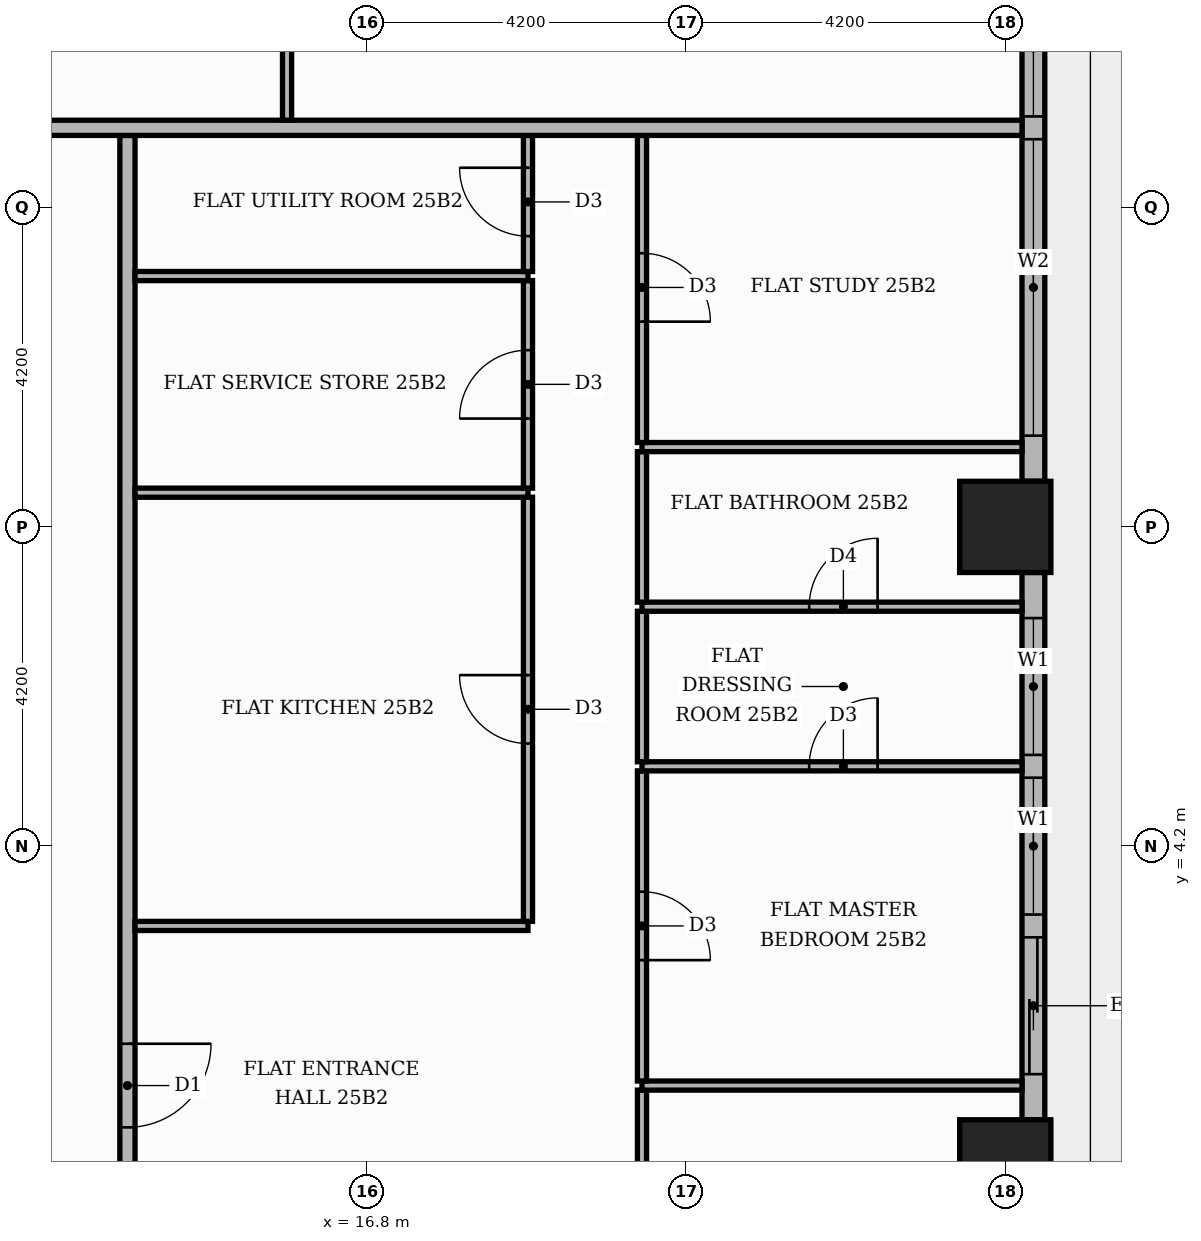
"""IFC4 building model, lengths in metres.
Left out: names, types, materials, properties, quantities, classifications, styles, units other than length and angle.
Written with IfcOpenShell. Run it as: python <this file> out.ifc"""

import sys

from ifc_helpers import new_model, si_unit, direction, frame, frame_2d, origin, origin_2d, place, context, subcontext, project, spatial, rectangle, extrude, element, fill, save


model = new_model("IFC4")
c1 = context("Model", 3, precision=1e-05, world=origin(), true_north=direction((0.0, 1.0)))
c2 = subcontext(c1, "Body", "Model", "MODEL_VIEW")
j1 = project(units=[si_unit("LENGTHUNIT", "METRE"), si_unit("PLANEANGLEUNIT", "RADIAN")], contexts=[c1])
p1 = place(None, origin())
s1 = spatial("IfcSite", under=j1, at=p1, CompositionType="ELEMENT")
p2 = place(p1, origin())
s2 = spatial("IfcBuilding", under=s1, at=p2, CompositionType="ELEMENT")
p3 = place(p2, frame((0.0, 0.0, 106.5)))
s3 = spatial("IfcBuildingStorey", under=s2, at=p3, CompositionType="ELEMENT", Elevation=106.5)
for number, where, z_axis, x_axis in (
    (1, (25.2, 0.0, 0.0), (0.0, 0.0, 1.0), (1.0, 0.0, 0.0)),
    (2, (25.2, 8.4, 0.0), (0.0, 0.0, 1.0), (1.0, 0.0, 0.0)),
):
    element("IfcColumn", number, at=place(p3, frame(where, z_axis=z_axis, x_axis=x_axis)), inside=s3, PredefinedType="COLUMN", context=c2, shape_type="SweptSolid", body=[
        extrude(rectangle(XDim=1.2, YDim=1.2, at=origin_2d()), origin(), (0.0, 0.0, 1.0), 3.9),
    ])
p4 = place(p3, frame((25.57, 0.6, 0.0), z_axis=(0.0, 0.0, 1.0), x_axis=(0.0, 1.0, 0.0)))
e3 = element("IfcWall", 3, at=p4, inside=s3, PredefinedType="STANDARD", context=c2, shape_type="SweptSolid", body=[
    extrude(rectangle(XDim=7.2, YDim=0.3, at=frame_2d((3.6, 0.0))), origin(), (0.0, 0.0, 1.0), 3.48),
])
p5 = place(p4, frame((0.6, 0.0, 0.0)))
e4 = element("IfcOpeningElement", 4, at=p5, cuts=e3, PredefinedType="OPENING", context=c2, shape_type="SweptSolid", body=[
    extrude(rectangle(XDim=1.8, YDim=2.4, at=frame_2d((0.9, 1.2))), frame((0.0, 0.16, 0.0), z_axis=(0.0, -1.0, 0.0), x_axis=(1.0, 0.0, 0.0)), (0.0, 0.0, 1.0), 0.32),
])
p6 = place(p4, frame((2.7, 0.0, 0.9)))
e5 = element("IfcOpeningElement", 5, at=p6, cuts=e3, PredefinedType="OPENING", context=c2, shape_type="SweptSolid", body=[
    extrude(rectangle(XDim=1.8, YDim=2.1, at=frame_2d((0.9, 1.05))), frame((0.0, 0.16, 0.0), z_axis=(0.0, -1.0, 0.0), x_axis=(1.0, 0.0, 0.0)), (0.0, 0.0, 1.0), 0.32),
])
p7 = place(p4, frame((4.8, 0.0, 0.9)))
e6 = element("IfcOpeningElement", 6, at=p7, cuts=e3, PredefinedType="OPENING", context=c2, shape_type="SweptSolid", body=[
    extrude(rectangle(XDim=1.8, YDim=2.1, at=frame_2d((0.9, 1.05))), frame((0.0, 0.16, 0.0), z_axis=(0.0, -1.0, 0.0), x_axis=(1.0, 0.0, 0.0)), (0.0, 0.0, 1.0), 0.32),
])
p8 = place(p3, frame((25.57, 9.0, 0.0), z_axis=(0.0, 0.0, 1.0), x_axis=(0.0, 1.0, 0.0)))
e7 = element("IfcWall", 7, at=p8, inside=s3, PredefinedType="STANDARD", context=c2, shape_type="SweptSolid", body=[
    extrude(rectangle(XDim=7.2, YDim=0.3, at=frame_2d((3.6, 0.0))), origin(), (0.0, 0.0, 1.0), 3.48),
])
p9 = place(p8, frame((0.6, 0.0, 0.9)))
e8 = element("IfcOpeningElement", 8, at=p9, cuts=e7, PredefinedType="OPENING", context=c2, shape_type="SweptSolid", body=[
    extrude(rectangle(XDim=3.9, YDim=2.1, at=frame_2d((1.95, 1.05))), frame((0.0, 0.16, 0.0), z_axis=(0.0, -1.0, 0.0), x_axis=(1.0, 0.0, 0.0)), (0.0, 0.0, 1.0), 0.32),
])
p10 = place(p8, frame((4.8, 0.0, 0.9)))
e9 = element("IfcOpeningElement", 9, at=p10, cuts=e7, PredefinedType="OPENING", context=c2, shape_type="SweptSolid", body=[
    extrude(rectangle(XDim=1.8, YDim=2.1, at=frame_2d((0.9, 1.05))), frame((0.0, 0.16, 0.0), z_axis=(0.0, -1.0, 0.0), x_axis=(1.0, 0.0, 0.0)), (0.0, 0.0, 1.0), 0.32),
])
p11 = place(p3, frame((13.65, -5.15, 0.0), z_axis=(0.0, 0.0, 1.0), x_axis=(0.0, 1.0, 0.0)))
e10 = element("IfcWall", 10, at=p11, inside=s3, PredefinedType="PARTITIONING", context=c2, shape_type="SweptSolid", body=[
    extrude(rectangle(XDim=18.7, YDim=0.2, at=frame_2d((9.35, 0.0))), origin(), (0.0, 0.0, 1.0), 3.48),
])
p12 = place(p11, frame((5.65, 0.0, 0.0)))
e11 = element("IfcOpeningElement", 11, at=p12, cuts=e10, PredefinedType="OPENING", context=c2, shape_type="SweptSolid", body=[
    extrude(rectangle(XDim=1.1, YDim=2.4, at=frame_2d((0.55, 1.2))), frame((0.0, 0.11, 0.0), z_axis=(0.0, -1.0, 0.0), x_axis=(1.0, 0.0, 0.0)), (0.0, 0.0, 1.0), 0.22),
])
p13 = place(p3, frame((20.42, -5.15, 0.0), z_axis=(0.0, 0.0, 1.0), x_axis=(0.0, 1.0, 0.0)))
e12 = element("IfcWall", 12, at=p13, inside=s3, PredefinedType="PARTITIONING", context=c2, shape_type="SweptSolid", body=[
    extrude(rectangle(XDim=6.14, YDim=0.12, at=frame_2d((3.07, 0.0))), origin(), (0.0, 0.0, 1.0), 3.48),
])
p14 = place(p13, frame((2.55, 0.0, 0.0)))
e13 = element("IfcOpeningElement", 13, at=p14, cuts=e12, PredefinedType="OPENING", context=c2, shape_type="SweptSolid", body=[
    extrude(rectangle(XDim=1.0, YDim=2.1, at=frame_2d((0.5, 1.05))), frame((0.0, 0.07, 0.0), z_axis=(0.0, -1.0, 0.0), x_axis=(1.0, 0.0, 0.0)), (0.0, 0.0, 1.0), 0.14),
])
p15 = place(p3, frame((20.42, 1.05, 0.0), z_axis=(0.0, 0.0, 1.0), x_axis=(1.0, 0.0, 0.0)))
e14 = element("IfcWall", 14, at=p15, inside=s3, PredefinedType="PARTITIONING", context=c2, shape_type="SweptSolid", body=[
    extrude(rectangle(XDim=5.0, YDim=0.12, at=frame_2d((2.5, 0.0))), origin(), (0.0, 0.0, 1.0), 3.48),
])
p16 = place(p3, frame((20.42, 1.11, 0.0), z_axis=(0.0, 0.0, 1.0), x_axis=(0.0, 1.0, 0.0)))
e15 = element("IfcWall", 15, at=p16, inside=s3, PredefinedType="PARTITIONING", context=c2, shape_type="SweptSolid", body=[
    extrude(rectangle(XDim=4.08, YDim=0.12, at=frame_2d((2.04, 0.0))), origin(), (0.0, 0.0, 1.0), 3.48),
])
p17 = place(p16, frame((1.59, 0.0, 0.0)))
e16 = element("IfcOpeningElement", 16, at=p17, cuts=e15, PredefinedType="OPENING", context=c2, shape_type="SweptSolid", body=[
    extrude(rectangle(XDim=0.9, YDim=2.1, at=frame_2d((0.45, 1.05))), frame((0.0, 0.07, 0.0), z_axis=(0.0, -1.0, 0.0), x_axis=(1.0, 0.0, 0.0)), (0.0, 0.0, 1.0), 0.14),
])
p18 = place(p3, frame((13.75, 3.15, 0.0), z_axis=(0.0, 0.0, 1.0), x_axis=(1.0, 0.0, 0.0)))
e17 = element("IfcWall", 17, at=p18, inside=s3, PredefinedType="PARTITIONING", context=c2, shape_type="SweptSolid", body=[
    extrude(rectangle(XDim=5.17, YDim=0.12, at=frame_2d((2.585, 0.0))), origin(), (0.0, 0.0, 1.0), 3.48),
])
p19 = place(p3, frame((18.92, 3.21, 0.0), z_axis=(0.0, 0.0, 1.0), x_axis=(0.0, 1.0, 0.0)))
e18 = element("IfcWall", 18, at=p19, inside=s3, PredefinedType="PARTITIONING", context=c2, shape_type="SweptSolid", body=[
    extrude(rectangle(XDim=5.58, YDim=0.12, at=frame_2d((2.79, 0.0))), origin(), (0.0, 0.0, 1.0), 3.48),
])
p20 = place(p19, frame((2.34, 0.0, 0.0)))
e19 = element("IfcOpeningElement", 19, at=p20, cuts=e18, PredefinedType="OPENING", context=c2, shape_type="SweptSolid", body=[
    extrude(rectangle(XDim=0.9, YDim=2.1, at=frame_2d((0.45, 1.05))), frame((0.0, 0.07, 0.0), z_axis=(0.0, -1.0, 0.0), x_axis=(1.0, 0.0, 0.0)), (0.0, 0.0, 1.0), 0.14),
])
p21 = place(p3, frame((20.42, 5.25, 0.0), z_axis=(0.0, 0.0, 1.0), x_axis=(1.0, 0.0, 0.0)))
e20 = element("IfcWall", 20, at=p21, inside=s3, PredefinedType="PARTITIONING", context=c2, shape_type="SweptSolid", body=[
    extrude(rectangle(XDim=5.0, YDim=0.12, at=frame_2d((2.5, 0.0))), origin(), (0.0, 0.0, 1.0), 3.48),
])
p22 = place(p21, frame((2.2, 0.0, 0.0)))
e21 = element("IfcOpeningElement", 21, at=p22, cuts=e20, PredefinedType="OPENING", context=c2, shape_type="SweptSolid", body=[
    extrude(rectangle(XDim=0.9, YDim=2.1, at=frame_2d((0.45, 1.05))), frame((0.0, 0.07, 0.0), z_axis=(0.0, -1.0, 0.0), x_axis=(1.0, 0.0, 0.0)), (0.0, 0.0, 1.0), 0.14),
])
p23 = place(p3, frame((20.42, 5.31, 0.0), z_axis=(0.0, 0.0, 1.0), x_axis=(0.0, 1.0, 0.0)))
e22 = element("IfcWall", 22, at=p23, inside=s3, PredefinedType="PARTITIONING", context=c2, shape_type="SweptSolid", body=[
    extrude(rectangle(XDim=1.98, YDim=0.12, at=frame_2d((0.99, 0.0))), origin(), (0.0, 0.0, 1.0), 3.48),
])
p24 = place(p3, frame((20.42, 7.35, 0.0), z_axis=(0.0, 0.0, 1.0), x_axis=(1.0, 0.0, 0.0)))
e23 = element("IfcWall", 23, at=p24, inside=s3, PredefinedType="PARTITIONING", context=c2, shape_type="SweptSolid", body=[
    extrude(rectangle(XDim=5.0, YDim=0.12, at=frame_2d((2.5, 0.0))), origin(), (0.0, 0.0, 1.0), 3.48),
])
p25 = place(p24, frame((2.2, 0.0, 0.0)))
e24 = element("IfcOpeningElement", 24, at=p25, cuts=e23, PredefinedType="OPENING", context=c2, shape_type="SweptSolid", body=[
    extrude(rectangle(XDim=0.9, YDim=2.1, at=frame_2d((0.45, 1.05))), frame((0.0, 0.07, 0.0), z_axis=(0.0, -1.0, 0.0), x_axis=(1.0, 0.0, 0.0)), (0.0, 0.0, 1.0), 0.14),
])
p26 = place(p3, frame((20.42, 7.41, 0.0), z_axis=(0.0, 0.0, 1.0), x_axis=(0.0, 1.0, 0.0)))
e25 = element("IfcWall", 25, at=p26, inside=s3, PredefinedType="PARTITIONING", context=c2, shape_type="SweptSolid", body=[
    extrude(rectangle(XDim=1.98, YDim=0.12, at=frame_2d((0.99, 0.0))), origin(), (0.0, 0.0, 1.0), 3.48),
])
p27 = place(p3, frame((13.75, 8.85, 0.0), z_axis=(0.0, 0.0, 1.0), x_axis=(1.0, 0.0, 0.0)))
e26 = element("IfcWall", 26, at=p27, inside=s3, PredefinedType="PARTITIONING", context=c2, shape_type="SweptSolid", body=[
    extrude(rectangle(XDim=5.17, YDim=0.12, at=frame_2d((2.585, 0.0))), origin(), (0.0, 0.0, 1.0), 3.48),
])
p28 = place(p3, frame((18.92, 8.91, 0.0), z_axis=(0.0, 0.0, 1.0), x_axis=(0.0, 1.0, 0.0)))
e27 = element("IfcWall", 27, at=p28, inside=s3, PredefinedType="PARTITIONING", context=c2, shape_type="SweptSolid", body=[
    extrude(rectangle(XDim=2.73, YDim=0.12, at=frame_2d((1.365, 0.0))), origin(), (0.0, 0.0, 1.0), 3.48),
])
p29 = place(p28, frame((0.915, 0.0, 0.0)))
e28 = element("IfcOpeningElement", 28, at=p29, cuts=e27, PredefinedType="OPENING", context=c2, shape_type="SweptSolid", body=[
    extrude(rectangle(XDim=0.9, YDim=2.1, at=frame_2d((0.45, 1.05))), frame((0.0, 0.07, 0.0), z_axis=(0.0, -1.0, 0.0), x_axis=(1.0, 0.0, 0.0)), (0.0, 0.0, 1.0), 0.14),
])
p30 = place(p3, frame((20.42, 9.45, 0.0), z_axis=(0.0, 0.0, 1.0), x_axis=(1.0, 0.0, 0.0)))
e29 = element("IfcWall", 29, at=p30, inside=s3, PredefinedType="PARTITIONING", context=c2, shape_type="SweptSolid", body=[
    extrude(rectangle(XDim=5.0, YDim=0.12, at=frame_2d((2.5, 0.0))), origin(), (0.0, 0.0, 1.0), 3.48),
])
p31 = place(p3, frame((20.42, 9.51, 0.0), z_axis=(0.0, 0.0, 1.0), x_axis=(0.0, 1.0, 0.0)))
e30 = element("IfcWall", 30, at=p31, inside=s3, PredefinedType="PARTITIONING", context=c2, shape_type="SweptSolid", body=[
    extrude(rectangle(XDim=4.04, YDim=0.12, at=frame_2d((2.02, 0.0))), origin(), (0.0, 0.0, 1.0), 3.48),
])
p32 = place(p31, frame((1.59, 0.0, 0.0)))
e31 = element("IfcOpeningElement", 31, at=p32, cuts=e30, PredefinedType="OPENING", context=c2, shape_type="SweptSolid", body=[
    extrude(rectangle(XDim=0.9, YDim=2.1, at=frame_2d((0.45, 1.05))), frame((0.0, 0.07, 0.0), z_axis=(0.0, -1.0, 0.0), x_axis=(1.0, 0.0, 0.0)), (0.0, 0.0, 1.0), 0.14),
])
p33 = place(p3, frame((13.75, 11.7, 0.0), z_axis=(0.0, 0.0, 1.0), x_axis=(1.0, 0.0, 0.0)))
e32 = element("IfcWall", 32, at=p33, inside=s3, PredefinedType="PARTITIONING", context=c2, shape_type="SweptSolid", body=[
    extrude(rectangle(XDim=5.17, YDim=0.12, at=frame_2d((2.585, 0.0))), origin(), (0.0, 0.0, 1.0), 3.48),
])
p34 = place(p3, frame((18.92, 11.76, 0.0), z_axis=(0.0, 0.0, 1.0), x_axis=(0.0, 1.0, 0.0)))
e33 = element("IfcWall", 33, at=p34, inside=s3, PredefinedType="PARTITIONING", context=c2, shape_type="SweptSolid", body=[
    extrude(rectangle(XDim=1.79, YDim=0.12, at=frame_2d((0.895, 0.0))), origin(), (0.0, 0.0, 1.0), 3.48),
])
p35 = place(p34, frame((0.465, 0.0, 0.0)))
e34 = element("IfcOpeningElement", 34, at=p35, cuts=e33, PredefinedType="OPENING", context=c2, shape_type="SweptSolid", body=[
    extrude(rectangle(XDim=0.9, YDim=2.1, at=frame_2d((0.45, 1.05))), frame((0.0, 0.07, 0.0), z_axis=(0.0, -1.0, 0.0), x_axis=(1.0, 0.0, 0.0)), (0.0, 0.0, 1.0), 0.14),
])
p36 = place(p3, frame((-13.65, 13.65, 0.0), z_axis=(0.0, 0.0, 1.0), x_axis=(1.0, 0.0, 0.0)))
e35 = element("IfcWall", 35, at=p36, inside=s3, PredefinedType="PARTITIONING", context=c2, shape_type="SweptSolid", body=[
    extrude(rectangle(XDim=39.07, YDim=0.2, at=frame_2d((19.535, 0.0))), origin(), (0.0, 0.0, 1.0), 3.48),
])
p37 = place(p36, frame((24.65, 0.0, 0.0)))
e36 = element("IfcOpeningElement", 36, at=p37, cuts=e35, PredefinedType="OPENING", context=c2, shape_type="SweptSolid", body=[
    extrude(rectangle(XDim=1.1, YDim=2.4, at=frame_2d((0.55, 1.2))), frame((0.0, 0.11, 0.0), z_axis=(0.0, -1.0, 0.0), x_axis=(1.0, 0.0, 0.0)), (0.0, 0.0, 1.0), 0.22),
])
p38 = place(p36, frame((14.15, 0.0, 0.0)))
e37 = element("IfcOpeningElement", 37, at=p38, cuts=e35, PredefinedType="OPENING", context=c2, shape_type="SweptSolid", body=[
    extrude(rectangle(XDim=1.1, YDim=2.4, at=frame_2d((0.55, 1.2))), frame((0.0, 0.11, 0.0), z_axis=(0.0, -1.0, 0.0), x_axis=(1.0, 0.0, 0.0)), (0.0, 0.0, 1.0), 0.22),
])
p39 = place(p3, frame((15.75, 13.75, 0.0), z_axis=(0.0, 0.0, 1.0), x_axis=(0.0, 1.0, 0.0)))
e38 = element("IfcWall", 38, at=p39, inside=s3, PredefinedType="PARTITIONING", context=c2, shape_type="SweptSolid", body=[
    extrude(rectangle(XDim=6.01, YDim=0.12, at=frame_2d((3.005, 0.0))), origin(), (0.0, 0.0, 1.0), 3.48),
])
p40 = place(p39, frame((2.485, 0.0, 0.0)))
e39 = element("IfcOpeningElement", 39, at=p40, cuts=e38, PredefinedType="OPENING", context=c2, shape_type="SweptSolid", body=[
    extrude(rectangle(XDim=1.0, YDim=2.1, at=frame_2d((0.5, 1.05))), frame((0.0, 0.07, 0.0), z_axis=(0.0, -1.0, 0.0), x_axis=(1.0, 0.0, 0.0)), (0.0, 0.0, 1.0), 0.14),
])
p41 = place(p5, origin())
e40 = element("IfcDoor", 40, at=p41, inside=s3, OperationType="SLIDING_TO_LEFT", PredefinedType="DOOR", context=c2, shape_type="SweptSolid", body=[
    extrude(rectangle(XDim=1.8, YDim=2.4, at=frame_2d((0.9, 1.2))), frame((0.0, 0.025, 0.0), z_axis=(0.0, -1.0, 0.0), x_axis=(1.0, 0.0, 0.0)), (0.0, 0.0, 1.0), 0.05),
])
fill(e4, e40)
p42 = place(p6, origin())
e41 = element("IfcWindow", 41, at=p42, inside=s3, PartitioningType="SINGLE_PANEL", PredefinedType="WINDOW", context=c2, shape_type="SweptSolid", body=[
    extrude(rectangle(XDim=1.8, YDim=2.1, at=frame_2d((0.9, 1.05))), frame((0.0, 0.03, 0.0), z_axis=(0.0, -1.0, 0.0), x_axis=(1.0, 0.0, 0.0)), (0.0, 0.0, 1.0), 0.06),
])
fill(e5, e41)
p43 = place(p7, origin())
e42 = element("IfcWindow", 42, at=p43, inside=s3, PartitioningType="SINGLE_PANEL", PredefinedType="WINDOW", context=c2, shape_type="SweptSolid", body=[
    extrude(rectangle(XDim=1.8, YDim=2.1, at=frame_2d((0.9, 1.05))), frame((0.0, 0.03, 0.0), z_axis=(0.0, -1.0, 0.0), x_axis=(1.0, 0.0, 0.0)), (0.0, 0.0, 1.0), 0.06),
])
fill(e6, e42)
p44 = place(p9, origin())
e43 = element("IfcWindow", 43, at=p44, inside=s3, PartitioningType="SINGLE_PANEL", PredefinedType="WINDOW", context=c2, shape_type="SweptSolid", body=[
    extrude(rectangle(XDim=3.9, YDim=2.1, at=frame_2d((1.95, 1.05))), frame((0.0, 0.03, 0.0), z_axis=(0.0, -1.0, 0.0), x_axis=(1.0, 0.0, 0.0)), (0.0, 0.0, 1.0), 0.06),
])
fill(e8, e43)
p45 = place(p10, origin())
e44 = element("IfcWindow", 44, at=p45, inside=s3, PartitioningType="SINGLE_PANEL", PredefinedType="WINDOW", context=c2, shape_type="SweptSolid", body=[
    extrude(rectangle(XDim=1.8, YDim=2.1, at=frame_2d((0.9, 1.05))), frame((0.0, 0.03, 0.0), z_axis=(0.0, -1.0, 0.0), x_axis=(1.0, 0.0, 0.0)), (0.0, 0.0, 1.0), 0.06),
])
fill(e9, e44)
p46 = place(p12, frame((1.1, 0.0, 0.0), z_axis=(0.0, 0.0, 1.0), x_axis=(-1.0, 0.0, 0.0)))
e45 = element("IfcDoor", 45, at=p46, inside=s3, OperationType="SINGLE_SWING_RIGHT", PredefinedType="DOOR", context=c2, shape_type="SweptSolid", body=[
    extrude(rectangle(XDim=1.1, YDim=2.4, at=frame_2d((0.55, 1.2))), frame((0.0, 0.025, 0.0), z_axis=(0.0, -1.0, 0.0), x_axis=(1.0, 0.0, 0.0)), (0.0, 0.0, 1.0), 0.05),
])
fill(e11, e45)
p47 = place(p20, origin())
e46 = element("IfcDoor", 46, at=p47, inside=s3, OperationType="SINGLE_SWING_RIGHT", PredefinedType="DOOR", context=c2, shape_type="SweptSolid", body=[
    extrude(rectangle(XDim=0.9, YDim=2.1, at=frame_2d((0.45, 1.05))), frame((0.0, 0.025, 0.0), z_axis=(0.0, -1.0, 0.0), x_axis=(1.0, 0.0, 0.0)), (0.0, 0.0, 1.0), 0.05),
])
fill(e19, e46)
p48 = place(p29, origin())
e47 = element("IfcDoor", 47, at=p48, inside=s3, OperationType="SINGLE_SWING_LEFT", PredefinedType="DOOR", context=c2, shape_type="SweptSolid", body=[
    extrude(rectangle(XDim=0.9, YDim=2.1, at=frame_2d((0.45, 1.05))), frame((0.0, 0.025, 0.0), z_axis=(0.0, -1.0, 0.0), x_axis=(1.0, 0.0, 0.0)), (0.0, 0.0, 1.0), 0.05),
])
fill(e28, e47)
p49 = place(p35, origin())
e48 = element("IfcDoor", 48, at=p49, inside=s3, OperationType="SINGLE_SWING_RIGHT", PredefinedType="DOOR", context=c2, shape_type="SweptSolid", body=[
    extrude(rectangle(XDim=0.9, YDim=2.1, at=frame_2d((0.45, 1.05))), frame((0.0, 0.025, 0.0), z_axis=(0.0, -1.0, 0.0), x_axis=(1.0, 0.0, 0.0)), (0.0, 0.0, 1.0), 0.05),
])
fill(e34, e48)
p50 = place(p17, frame((0.9, 0.0, 0.0), z_axis=(0.0, 0.0, 1.0), x_axis=(-1.0, 0.0, 0.0)))
e49 = element("IfcDoor", 49, at=p50, inside=s3, OperationType="SINGLE_SWING_LEFT", PredefinedType="DOOR", context=c2, shape_type="SweptSolid", body=[
    extrude(rectangle(XDim=0.9, YDim=2.1, at=frame_2d((0.45, 1.05))), frame((0.0, 0.025, 0.0), z_axis=(0.0, -1.0, 0.0), x_axis=(1.0, 0.0, 0.0)), (0.0, 0.0, 1.0), 0.05),
])
fill(e16, e49)
p51 = place(p22, origin())
e50 = element("IfcDoor", 50, at=p51, inside=s3, OperationType="SINGLE_SWING_RIGHT", PredefinedType="DOOR", context=c2, shape_type="SweptSolid", body=[
    extrude(rectangle(XDim=0.9, YDim=2.1, at=frame_2d((0.45, 1.05))), frame((0.0, 0.025, 0.0), z_axis=(0.0, -1.0, 0.0), x_axis=(1.0, 0.0, 0.0)), (0.0, 0.0, 1.0), 0.05),
])
fill(e21, e50)
p52 = place(p25, origin())
e51 = element("IfcDoor", 51, at=p52, inside=s3, OperationType="SINGLE_SWING_RIGHT", PredefinedType="DOOR", context=c2, shape_type="SweptSolid", body=[
    extrude(rectangle(XDim=0.9, YDim=2.1, at=frame_2d((0.45, 1.05))), frame((0.0, 0.025, 0.0), z_axis=(0.0, -1.0, 0.0), x_axis=(1.0, 0.0, 0.0)), (0.0, 0.0, 1.0), 0.05),
])
fill(e24, e51)
p53 = place(p32, frame((0.9, 0.0, 0.0), z_axis=(0.0, 0.0, 1.0), x_axis=(-1.0, 0.0, 0.0)))
e52 = element("IfcDoor", 52, at=p53, inside=s3, OperationType="SINGLE_SWING_LEFT", PredefinedType="DOOR", context=c2, shape_type="SweptSolid", body=[
    extrude(rectangle(XDim=0.9, YDim=2.1, at=frame_2d((0.45, 1.05))), frame((0.0, 0.025, 0.0), z_axis=(0.0, -1.0, 0.0), x_axis=(1.0, 0.0, 0.0)), (0.0, 0.0, 1.0), 0.05),
])
fill(e31, e52)
save(model, sys.argv[1])
